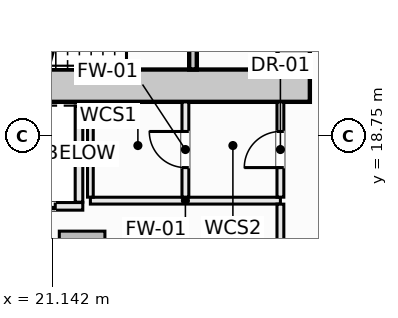
"""IFC4 building model, lengths in metres.
Left out: names, types, materials, properties, quantities, classifications, styles, units other than length and angle.
Written with IfcOpenShell. Run it as: python <this file> out.ifc"""

import sys

from ifc_helpers import new_model, si_unit, direction, frame, frame_2d, origin, origin_2d, place, context, subcontext, project, spatial, rectangle, extrude, element, fill, save


model = new_model("IFC4")
c1 = context("Model", 3, precision=1e-05, world=origin(), true_north=direction((0.0, 1.0)))
c2 = subcontext(c1, "Body", "Model", "MODEL_VIEW")
j1 = project(units=[si_unit("LENGTHUNIT", "METRE"), si_unit("PLANEANGLEUNIT", "RADIAN")], contexts=[c1])
p1 = place(None, origin())
s1 = spatial("IfcSite", under=j1, at=p1, CompositionType="ELEMENT")
p2 = place(p1, origin())
s2 = spatial("IfcBuilding", under=s1, at=p2, CompositionType="ELEMENT")
p3 = place(p2, frame((0.0, 0.0, 5.0)))
s3 = spatial("IfcBuildingStorey", under=s2, at=p3, CompositionType="ELEMENT", Elevation=5.0)
p4 = place(p3, frame((14.075, 20.075, -0.26), z_axis=(0.0, 0.0, 1.0), x_axis=(1.0, 0.0, 0.0)))
e1 = element("IfcWall", 1, at=p4, inside=s3, PredefinedType="SHEAR", context=c2, shape_type="SweptSolid", body=[
    extrude(rectangle(XDim=13.85, YDim=0.85, at=frame_2d((6.925, 0.0))), origin(), (0.0, 0.0, 1.0), 5.0),
])
p5 = place(p3, frame((27.5, 20.55, -0.26), z_axis=(0.0, 0.0, 1.0), x_axis=(0.0, 1.0, 0.0)))
e2 = element("IfcWall", 2, at=p5, inside=s3, PredefinedType="SHEAR", context=c2, shape_type="SweptSolid", body=[
    extrude(rectangle(XDim=1.5, YDim=0.85, at=frame_2d((0.75, 0.0))), origin(), (0.0, 0.0, 1.0), 5.0),
])
p6 = place(p3, frame((21.932, 15.648, -0.26), z_axis=(0.0, 0.0, 1.0), x_axis=(1.0, 0.0, 0.0)))
e3 = element("IfcColumn", 3, at=p6, inside=s3, PredefinedType="COLUMN", context=c2, shape_type="SweptSolid", body=[
    extrude(rectangle(XDim=1.2, YDim=1.2, at=origin_2d()), origin(), (0.0, 0.0, 1.0), 5.0),
])
p7 = place(p3, frame((24.85, 20.502, -0.26), z_axis=(0.0, 0.0, 1.0), x_axis=(0.0, 1.0, 0.0)))
e4 = element("IfcWall", 4, at=p7, inside=s3, PredefinedType="SHEAR", context=c2, shape_type="SweptSolid", body=[
    extrude(rectangle(XDim=3.038, YDim=0.2, at=frame_2d((1.519, 0.0))), origin(), (0.0, 0.0, 1.0), 5.0),
])
p8 = place(p7, frame((0.969, 0.0, 0.26)))
e5 = element("IfcOpeningElement", 5, at=p8, cuts=e4, PredefinedType="OPENING", context=c2, shape_type="SweptSolid", body=[
    extrude(rectangle(XDim=1.1, YDim=2.15, at=frame_2d((0.55, 1.075))), frame((0.0, 0.11, 0.0), z_axis=(0.0, -1.0, 0.0), x_axis=(1.0, 0.0, 0.0)), (0.0, 0.0, 1.0), 0.22),
])
p9 = place(p3, frame((19.4, 16.9, 0.0), z_axis=(0.0, 0.0, 1.0), x_axis=(1.0, 0.0, 0.0)))
e6 = element("IfcWall", 6, at=p9, inside=s3, PredefinedType="SOLIDWALL", context=c2, shape_type="SweptSolid", body=[
    extrude(rectangle(XDim=2.55, YDim=0.2, at=frame_2d((1.275, 0.0))), origin(), (0.0, 0.0, 1.0), 4.74),
])
p10 = place(p9, frame((0.725, 0.0, 0.0)))
e7 = element("IfcOpeningElement", 7, at=p10, cuts=e6, PredefinedType="OPENING", context=c2, shape_type="SweptSolid", body=[
    extrude(rectangle(XDim=1.1, YDim=2.2, at=frame_2d((0.55, 1.1))), frame((0.0, 0.11, 0.0), z_axis=(0.0, -1.0, 0.0), x_axis=(1.0, 0.0, 0.0)), (0.0, 0.0, 1.0), 0.22),
])
p11 = place(p3, frame((21.85, 17.01, 0.0), z_axis=(0.0, 0.0, 1.0), x_axis=(0.0, 1.0, 0.0)))
e8 = element("IfcWall", 8, at=p11, inside=s3, PredefinedType="SOLIDWALL", context=c2, shape_type="SweptSolid", body=[
    extrude(rectangle(XDim=2.53, YDim=0.2, at=frame_2d((1.265, 0.0))), origin(), (0.0, 0.0, 1.0), 4.74),
])
p12 = place(p3, frame((22.15, 17.05, 0.0), z_axis=(0.0, 0.0, 1.0), x_axis=(1.0, 0.0, 0.0)))
e9 = element("IfcWall", 9, at=p12, inside=s3, PredefinedType="SOLIDWALL", context=c2, shape_type="SweptSolid", body=[
    extrude(rectangle(XDim=5.0, YDim=0.18, at=frame_2d((2.5, 0.0))), origin(), (0.0, 0.0, 1.0), 4.74),
])
p13 = place(p3, frame((22.15, 17.142, 0.0), z_axis=(0.0, 0.0, 1.0), x_axis=(0.0, 1.0, 0.0)))
e10 = element("IfcWall", 10, at=p13, inside=s3, PredefinedType="PARTITIONING", context=c2, shape_type="SweptSolid", body=[
    extrude(rectangle(XDim=2.506, YDim=0.15, at=frame_2d((1.253, 0.0))), origin(), (0.0, 0.0, 1.0), 4.74),
])
p14 = place(p3, frame((24.65, 17.142, 0.0), z_axis=(0.0, 0.0, 1.0), x_axis=(0.0, 1.0, 0.0)))
e11 = element("IfcWall", 11, at=p14, inside=s3, PredefinedType="SOLIDWALL", context=c2, shape_type="SweptSolid", body=[
    extrude(rectangle(XDim=2.506, YDim=0.18, at=frame_2d((1.253, 0.0))), origin(), (0.0, 0.0, 1.0), 4.74),
])
p15 = place(p14, frame((0.778, 0.0, 0.0)))
e12 = element("IfcOpeningElement", 12, at=p15, cuts=e11, PredefinedType="OPENING", context=c2, shape_type="SweptSolid", body=[
    extrude(rectangle(XDim=0.95, YDim=2.1, at=frame_2d((0.475, 1.05))), frame((0.0, 0.1, 0.0), z_axis=(0.0, -1.0, 0.0), x_axis=(1.0, 0.0, 0.0)), (0.0, 0.0, 1.0), 0.2),
])
p16 = place(p3, frame((27.15, 13.85, 0.0), z_axis=(0.0, 0.0, 1.0), x_axis=(0.0, 1.0, 0.0)))
e13 = element("IfcWall", 13, at=p16, inside=s3, PredefinedType="SOLIDWALL", context=c2, shape_type="SweptSolid", body=[
    extrude(rectangle(XDim=3.108, YDim=0.18, at=frame_2d((1.554, 0.0))), origin(), (0.0, 0.0, 1.0), 4.74),
])
p17 = place(p3, frame((27.15, 17.142, 0.0), z_axis=(0.0, 0.0, 1.0), x_axis=(0.0, 1.0, 0.0)))
e14 = element("IfcWall", 14, at=p17, inside=s3, PredefinedType="SOLIDWALL", context=c2, shape_type="SweptSolid", body=[
    extrude(rectangle(XDim=2.506, YDim=0.18, at=frame_2d((1.253, 0.0))), origin(), (0.0, 0.0, 1.0), 4.74),
])
p18 = place(p17, frame((0.778, 0.0, 0.0)))
e15 = element("IfcOpeningElement", 15, at=p18, cuts=e14, PredefinedType="OPENING", context=c2, shape_type="SweptSolid", body=[
    extrude(rectangle(XDim=0.95, YDim=2.1, at=frame_2d((0.475, 1.05))), frame((0.0, 0.1, 0.0), z_axis=(0.0, -1.0, 0.0), x_axis=(1.0, 0.0, 0.0)), (0.0, 0.0, 1.0), 0.2),
])
p19 = place(p10, origin())
e16 = element("IfcDoor", 16, at=p19, inside=s3, OperationType="SLIDING_TO_LEFT", PredefinedType="DOOR", context=c2, shape_type="SweptSolid", body=[
    extrude(rectangle(XDim=1.1, YDim=2.2, at=frame_2d((0.55, 1.1))), frame((0.0, 0.025, 0.0), z_axis=(0.0, -1.0, 0.0), x_axis=(1.0, 0.0, 0.0)), (0.0, 0.0, 1.0), 0.05),
])
fill(e7, e16)
p20 = place(p18, origin())
e17 = element("IfcDoor", 17, at=p20, inside=s3, OperationType="SINGLE_SWING_LEFT", PredefinedType="DOOR", context=c2, shape_type="SweptSolid", body=[
    extrude(rectangle(XDim=0.95, YDim=2.1, at=frame_2d((0.475, 1.05))), frame((0.0, 0.025, 0.0), z_axis=(0.0, -1.0, 0.0), x_axis=(1.0, 0.0, 0.0)), (0.0, 0.0, 1.0), 0.05),
])
fill(e15, e17)
p21 = place(p15, origin())
e18 = element("IfcDoor", 18, at=p21, inside=s3, OperationType="SINGLE_SWING_RIGHT", PredefinedType="DOOR", context=c2, shape_type="SweptSolid", body=[
    extrude(rectangle(XDim=0.95, YDim=2.1, at=frame_2d((0.475, 1.05))), frame((0.0, 0.025, 0.0), z_axis=(0.0, -1.0, 0.0), x_axis=(1.0, 0.0, 0.0)), (0.0, 0.0, 1.0), 0.05),
])
fill(e12, e18)
save(model, sys.argv[1])
